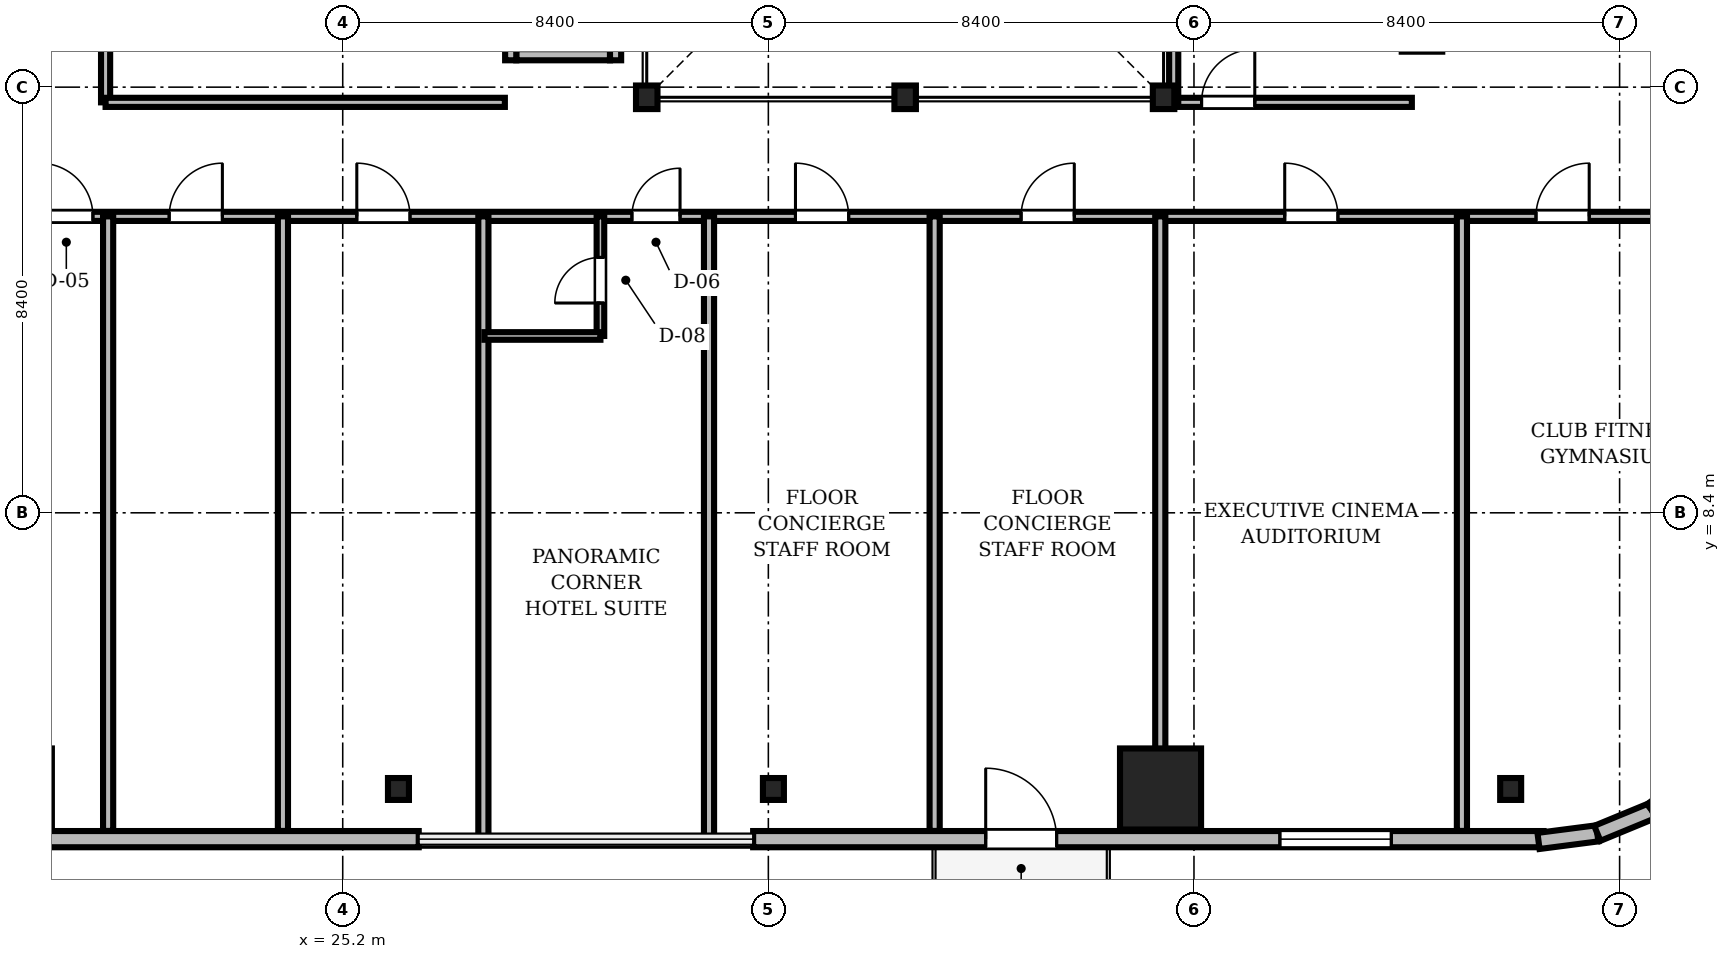
"""IFC4 building model, lengths in metres.
Left out: names, types, materials, properties, quantities, classifications, styles, units other than length and angle.
Written with IfcOpenShell. Run it as: python <this file> out.ifc"""

import sys

from ifc_helpers import new_model, si_unit, direction, frame, frame_2d, origin, origin_2d, place, context, subcontext, project, spatial, rectangle, i_section, extrude, source, transform, mapped, element, fill, save


model = new_model("IFC4")
c1 = context("Model", 3, precision=1e-05, world=origin(), true_north=direction((0.0, 1.0)))
c2 = subcontext(c1, "Body", "Model", "MODEL_VIEW")
j1 = project(units=[si_unit("LENGTHUNIT", "METRE"), si_unit("PLANEANGLEUNIT", "RADIAN")], contexts=[c1])
p1 = place(None, origin())
s1 = spatial("IfcSite", under=j1, at=p1, CompositionType="ELEMENT")
p2 = place(p1, origin())
s2 = spatial("IfcBuilding", under=s1, at=p2, CompositionType="ELEMENT")
p3 = place(p2, frame((0.0, 0.0, 129.8)))
s3 = spatial("IfcBuildingStorey", under=s2, at=p3, CompositionType="ELEMENT", Elevation=129.8)
m1 = source(origin(), c2, "Body", "SweptSolid", [
    extrude(i_section(OverallWidth=0.424, OverallDepth=0.465, WebThickness=0.035, FlangeThickness=0.056, FilletRadius=0.015, at=origin_2d()), origin(), (0.0, 0.0, 1.0), 3.46),
])
for number, where, z_axis, x_axis in (
    (1, (31.2, 16.6, 0.0), (0.0, 0.0, 1.0), (1.0, 0.0, 0.0)),
    (2, (36.3, 16.6, 0.0), (0.0, 0.0, 1.0), (1.0, 0.0, 0.0)),
    (3, (41.4, 16.6, 0.0), (0.0, 0.0, 1.0), (1.0, 0.0, 0.0)),
):
    element("IfcColumn", number, at=place(p3, frame(where, z_axis=z_axis, x_axis=x_axis)), inside=s3, PredefinedType="COLUMN", context=c2, shape_type="MappedRepresentation", body=[
        mapped(m1, transform((0.0, 0.0, 0.0), scale=1.0)),
    ])
m2 = source(origin(), c2, "Body", "SweptSolid", [
    extrude(rectangle(XDim=1.6, YDim=1.6, at=origin_2d()), origin(), (0.0, 0.0, 1.0), 3.46),
])
for number, where, z_axis, x_axis in (
    (4, (18.66, 2.95, 0.0), (0.0, 0.0, 1.0), (1.0, 0.0, 0.0)),
    (5, (41.34, 2.95, 0.0), (0.0, 0.0, 1.0), (1.0, 0.0, 0.0)),
):
    element("IfcColumn", number, at=place(p3, frame(where, z_axis=z_axis, x_axis=x_axis)), inside=s3, PredefinedType="COLUMN", context=c2, shape_type="MappedRepresentation", body=[
        mapped(m2, transform((0.0, 0.0, 0.0), scale=1.0)),
    ])
m3 = source(origin(), c2, "Body", "SweptSolid", [
    extrude(i_section(OverallWidth=0.414, OverallDepth=0.432, WebThickness=0.026, FlangeThickness=0.04, FilletRadius=0.015, at=origin_2d()), origin(), (0.0, 0.0, 1.0), 3.46),
])
for number, where, z_axis, x_axis in (
    (6, (26.3, 2.95, 0.0), (0.0, 0.0, 1.0), (1.0, 0.0, 0.0)),
    (7, (33.7, 2.95, 0.0), (0.0, 0.0, 1.0), (1.0, 0.0, 0.0)),
    (8, (48.25, 2.95, 0.0), (0.0, 0.0, 1.0), (1.0, 0.0, 0.0)),
):
    element("IfcColumn", number, at=place(p3, frame(where, z_axis=z_axis, x_axis=x_axis)), inside=s3, PredefinedType="COLUMN", context=c2, shape_type="MappedRepresentation", body=[
        mapped(m3, transform((0.0, 0.0, 0.0), scale=1.0)),
    ])
m4 = source(origin(), c2, "Body", "SweptSolid", [
    extrude(rectangle(XDim=15.6, YDim=0.32, at=frame_2d((7.8, 0.0))), origin(), (0.0, 0.0, 1.0), 3.46),
])
p4 = place(p3, frame((11.1, 1.96, 0.0), z_axis=(0.0, 0.0, 1.0), x_axis=(1.0, 0.0, 0.0)))
e9 = element("IfcWall", 9, at=p4, inside=s3, PredefinedType="SOLIDWALL", context=c2, shape_type="MappedRepresentation", body=[
    mapped(m4, transform((0.0, 0.0, 0.0), scale=1.0)),
])
m5 = source(origin(), c2, "Body", "SweptSolid", [
    extrude(rectangle(XDim=2.2, YDim=2.4, at=frame_2d((1.1, 1.2))), frame((0.0, 0.17, 0.0), z_axis=(0.0, -1.0, 0.0), x_axis=(1.0, 0.0, 0.0)), (0.0, 0.0, 1.0), 0.34),
])
p5 = place(p4, frame((3.005, 0.0, 0.72)))
e10 = element("IfcOpeningElement", 10, at=p5, cuts=e9, PredefinedType="OPENING", context=c2, shape_type="MappedRepresentation", body=[
    mapped(m5, transform((0.0, 0.0, 0.0), scale=1.0)),
])
p6 = place(p3, frame((33.3, 1.96, 0.0), z_axis=(0.0, 0.0, 1.0), x_axis=(1.0, 0.0, 0.0)))
e11 = element("IfcWall", 11, at=p6, inside=s3, PredefinedType="SOLIDWALL", context=c2, shape_type="MappedRepresentation", body=[
    mapped(m4, transform((0.0, 0.0, 0.0), scale=1.0)),
])
m6 = source(origin(), c2, "Body", "SweptSolid", [
    extrude(rectangle(XDim=1.4, YDim=2.3, at=frame_2d((0.7, 1.15))), frame((0.0, 0.17, 0.0), z_axis=(0.0, -1.0, 0.0), x_axis=(1.0, 0.0, 0.0)), (0.0, 0.0, 1.0), 0.34),
])
p7 = place(p6, frame((4.59, 0.0, 0.0)))
e12 = element("IfcOpeningElement", 12, at=p7, cuts=e11, PredefinedType="OPENING", context=c2, shape_type="MappedRepresentation", body=[
    mapped(m6, transform((0.0, 0.0, 0.0), scale=1.0)),
])
p8 = place(p6, frame((10.395, 0.0, 0.72)))
e13 = element("IfcOpeningElement", 13, at=p8, cuts=e11, PredefinedType="OPENING", context=c2, shape_type="MappedRepresentation", body=[
    mapped(m5, transform((0.0, 0.0, 0.0), scale=1.0)),
])
m7 = source(origin(), c2, "Body", "SweptSolid", [
    extrude(rectangle(XDim=1.17, YDim=0.32, at=frame_2d((0.585, 0.0))), origin(), (0.0, 0.0, 1.0), 3.46),
])
p9 = place(p3, frame((48.8, 1.925, 0.0), z_axis=(0.0, 0.0, 1.0), x_axis=(0.991762485493, 0.128090485085, 0.0)))
e14 = element("IfcWall", 14, at=p9, inside=s3, PredefinedType="SOLIDWALL", context=c2, shape_type="MappedRepresentation", body=[
    mapped(m7, transform((0.0, 0.0, 0.0), scale=1.0)),
])
m8 = source(origin(), c2, "Body", "SweptSolid", [
    extrude(rectangle(XDim=1.169, YDim=0.32, at=frame_2d((0.585, 0.0))), origin(), (0.0, 0.0, 1.0), 3.46),
])
p10 = place(p3, frame((49.96, 2.074, 0.0), z_axis=(0.0, 0.0, 1.0), x_axis=(0.924479075121, 0.381232789334, 0.0)))
e15 = element("IfcWall", 15, at=p10, inside=s3, PredefinedType="SOLIDWALL", context=c2, shape_type="MappedRepresentation", body=[
    mapped(m8, transform((0.0, 0.0, 0.0), scale=1.0)),
])
m9 = source(origin(), c2, "Body", "SweptSolid", [
    extrude(rectangle(XDim=1.169, YDim=0.32, at=frame_2d((0.584, 0.0))), origin(), (0.0, 0.0, 1.0), 3.46),
])
p11 = place(p3, frame((51.041, 2.52, 0.0), z_axis=(0.0, 0.0, 1.0), x_axis=(0.793663520347, 0.608356981114, 0.0)))
e16 = element("IfcWall", 16, at=p11, inside=s3, PredefinedType="SOLIDWALL", context=c2, shape_type="MappedRepresentation", body=[
    mapped(m9, transform((0.0, 0.0, 0.0), scale=1.0)),
])
m10 = source(origin(), c2, "Body", "SweptSolid", [
    extrude(rectangle(XDim=1.85, YDim=0.22, at=frame_2d((0.925, 0.0))), origin(), (0.0, 0.0, 1.0), 3.46),
])
p12 = place(p3, frame((28.625, 17.44, 0.0), z_axis=(0.0, 0.0, 1.0), x_axis=(1.0, 0.0, 0.0)))
e17 = element("IfcWall", 17, at=p12, inside=s3, PredefinedType="SOLIDWALL", context=c2, shape_type="MappedRepresentation", body=[
    mapped(m10, transform((0.0, 0.0, 0.0), scale=1.0)),
])
m11 = source(origin(), c2, "Body", "SweptSolid", [
    extrude(rectangle(XDim=2.54, YDim=0.22, at=frame_2d((1.27, 0.0))), origin(), (0.0, 0.0, 1.0), 3.46),
])
for number, where, z_axis, x_axis in (
    (18, (28.515, 17.33, 0.0), (0.0, 0.0, 1.0), (0.0, 1.0, 0.0)),
    (19, (30.585, 17.33, 0.0), (0.0, 0.0, 1.0), (0.0, 1.0, 0.0)),
):
    element("IfcWall", number, at=place(p3, frame(where, z_axis=z_axis, x_axis=x_axis)), inside=s3, PredefinedType="SOLIDWALL", context=c2, shape_type="MappedRepresentation", body=[
        mapped(m11, transform((0.0, 0.0, 0.0), scale=1.0)),
    ])
m12 = source(origin(), c2, "Body", "SweptSolid", [
    extrude(rectangle(XDim=46.156, YDim=0.18, at=frame_2d((23.078, 0.0))), origin(), (0.0, 0.0, 1.0), 2.702),
])
p13 = place(p3, frame((6.922, 14.25, 0.0), z_axis=(0.0, 0.0, 1.0), x_axis=(1.0, 0.0, 0.0)))
e20 = element("IfcWall", 20, at=p13, inside=s3, PredefinedType="PARTITIONING", context=c2, shape_type="MappedRepresentation", body=[
    mapped(m12, transform((0.0, 0.0, 0.0), scale=1.0)),
])
m13 = source(origin(), c2, "Body", "SweptSolid", [
    extrude(rectangle(XDim=1.05, YDim=2.2, at=frame_2d((0.525, 1.1))), frame((0.0, 0.1, 0.0), z_axis=(0.0, -1.0, 0.0), x_axis=(1.0, 0.0, 0.0)), (0.0, 0.0, 1.0), 0.2),
])
p14 = place(p13, frame((12.298, 0.0, 0.0)))
e21 = element("IfcOpeningElement", 21, at=p14, cuts=e20, PredefinedType="OPENING", context=c2, shape_type="MappedRepresentation", body=[
    mapped(m13, transform((0.0, 0.0, 0.0), scale=1.0)),
])
p15 = place(p13, frame((14.853, 0.0, 0.0)))
e22 = element("IfcOpeningElement", 22, at=p15, cuts=e20, PredefinedType="OPENING", context=c2, shape_type="MappedRepresentation", body=[
    mapped(m13, transform((0.0, 0.0, 0.0), scale=1.0)),
])
p16 = place(p13, frame((18.556, 0.0, 0.0)))
e23 = element("IfcOpeningElement", 23, at=p16, cuts=e20, PredefinedType="OPENING", context=c2, shape_type="MappedRepresentation", body=[
    mapped(m13, transform((0.0, 0.0, 0.0), scale=1.0)),
])
m14 = source(origin(), c2, "Body", "SweptSolid", [
    extrude(rectangle(XDim=0.95, YDim=2.15, at=frame_2d((0.475, 1.075))), frame((0.0, 0.1, 0.0), z_axis=(0.0, -1.0, 0.0), x_axis=(1.0, 0.0, 0.0)), (0.0, 0.0, 1.0), 0.2),
])
p17 = place(p13, frame((23.985, 0.0, 0.0)))
e24 = element("IfcOpeningElement", 24, at=p17, cuts=e20, PredefinedType="OPENING", context=c2, shape_type="MappedRepresentation", body=[
    mapped(m14, transform((0.0, 0.0, 0.0), scale=1.0)),
])
p18 = place(p13, frame((27.213, 0.0, 0.0)))
e25 = element("IfcOpeningElement", 25, at=p18, cuts=e20, PredefinedType="OPENING", context=c2, shape_type="MappedRepresentation", body=[
    mapped(m13, transform((0.0, 0.0, 0.0), scale=1.0)),
])
p19 = place(p13, frame((31.666, 0.0, 0.0)))
e26 = element("IfcOpeningElement", 26, at=p19, cuts=e20, PredefinedType="OPENING", context=c2, shape_type="MappedRepresentation", body=[
    mapped(m13, transform((0.0, 0.0, 0.0), scale=1.0)),
])
p20 = place(p13, frame((36.869, 0.0, 0.0)))
e27 = element("IfcOpeningElement", 27, at=p20, cuts=e20, PredefinedType="OPENING", context=c2, shape_type="MappedRepresentation", body=[
    mapped(m13, transform((0.0, 0.0, 0.0), scale=1.0)),
])
p21 = place(p13, frame((41.828, 0.0, 0.0)))
e28 = element("IfcOpeningElement", 28, at=p21, cuts=e20, PredefinedType="OPENING", context=c2, shape_type="MappedRepresentation", body=[
    mapped(m13, transform((0.0, 0.0, 0.0), scale=1.0)),
])
m15 = source(origin(), c2, "Body", "SweptSolid", [
    extrude(rectangle(XDim=11.94, YDim=0.18, at=frame_2d((5.97, 0.0))), origin(), (0.0, 0.0, 1.0), 2.852),
])
p22 = place(p3, frame((20.52, 16.5, 0.0), z_axis=(0.0, 0.0, 1.0), x_axis=(0.0, 1.0, 0.0)))
e29 = element("IfcWall", 29, at=p22, inside=s3, PredefinedType="PARTITIONING", context=c2, shape_type="MappedRepresentation", body=[
    mapped(m15, transform((0.0, 0.0, 0.0), scale=1.0)),
])
p23 = place(p22, frame((4.5, 0.0, 0.0)))
e30 = element("IfcOpeningElement", 30, at=p23, cuts=e29, PredefinedType="OPENING", context=c2, shape_type="MappedRepresentation", body=[
    mapped(m13, transform((0.0, 0.0, 0.0), scale=1.0)),
])
m16 = source(origin(), c2, "Body", "SweptSolid", [
    extrude(rectangle(XDim=4.7, YDim=0.18, at=frame_2d((2.35, 0.0))), origin(), (0.0, 0.0, 1.0), 2.852),
])
p24 = place(p3, frame((41.6, 16.5, 0.0), z_axis=(0.0, 0.0, 1.0), x_axis=(1.0, 0.0, 0.0)))
e31 = element("IfcWall", 31, at=p24, inside=s3, PredefinedType="PARTITIONING", context=c2, shape_type="MappedRepresentation", body=[
    mapped(m16, transform((0.0, 0.0, 0.0), scale=1.0)),
])
p25 = place(p24, frame((0.55, 0.0, 0.0)))
e32 = element("IfcOpeningElement", 32, at=p25, cuts=e31, PredefinedType="OPENING", context=c2, shape_type="MappedRepresentation", body=[
    mapped(m13, transform((0.0, 0.0, 0.0), scale=1.0)),
])
m17 = source(origin(), c2, "Body", "SweptSolid", [
    extrude(rectangle(XDim=2.36, YDim=0.15, at=frame_2d((1.18, 0.0))), origin(), (0.0, 0.0, 1.0), 2.852),
])
p26 = place(p3, frame((30.286, 11.89, 0.0), z_axis=(0.0, 0.0, 1.0), x_axis=(0.0, 1.0, 0.0)))
e33 = element("IfcWall", 33, at=p26, inside=s3, PredefinedType="PARTITIONING", context=c2, shape_type="MappedRepresentation", body=[
    mapped(m17, transform((0.0, 0.0, 0.0), scale=1.0)),
])
m18 = source(origin(), c2, "Body", "SweptSolid", [
    extrude(rectangle(XDim=0.9, YDim=2.1, at=frame_2d((0.45, 1.05))), frame((0.0, 0.085, 0.0), z_axis=(0.0, -1.0, 0.0), x_axis=(1.0, 0.0, 0.0)), (0.0, 0.0, 1.0), 0.17),
])
p27 = place(p26, frame((0.65, 0.0, 0.0)))
e34 = element("IfcOpeningElement", 34, at=p27, cuts=e33, PredefinedType="OPENING", context=c2, shape_type="MappedRepresentation", body=[
    mapped(m18, transform((0.0, 0.0, 0.0), scale=1.0)),
])
m19 = source(origin(), c2, "Body", "SweptSolid", [
    extrude(rectangle(XDim=12.128, YDim=0.2, at=frame_2d((6.064, 0.0))), origin(), (0.0, 0.0, 1.0), 2.702),
])
for number, where, z_axis, x_axis in (
    (35, (20.57, 2.122, 0.0), (0.0, 0.0, 1.0), (0.0, 1.0, 0.0)),
    (36, (24.02, 2.122, 0.0), (0.0, 0.0, 1.0), (0.0, 1.0, 0.0)),
):
    element("IfcWall", number, at=place(p3, frame(where, z_axis=z_axis, x_axis=x_axis)), inside=s3, PredefinedType="PARTITIONING", context=c2, shape_type="MappedRepresentation", body=[
        mapped(m19, transform((0.0, 0.0, 0.0), scale=1.0)),
    ])
m20 = source(origin(), c2, "Body", "SweptSolid", [
    extrude(rectangle(XDim=12.32, YDim=0.2, at=frame_2d((6.16, 0.0))), origin(), (0.0, 0.0, 1.0), 2.702),
])
for number, where, z_axis, x_axis in (
    (37, (27.976, 1.93, 0.0), (0.0, 0.0, 1.0), (0.0, 1.0, 0.0)),
    (38, (32.429, 1.93, 0.0), (0.0, 0.0, 1.0), (0.0, 1.0, 0.0)),
):
    element("IfcWall", number, at=place(p3, frame(where, z_axis=z_axis, x_axis=x_axis)), inside=s3, PredefinedType="PARTITIONING", context=c2, shape_type="MappedRepresentation", body=[
        mapped(m20, transform((0.0, 0.0, 0.0), scale=1.0)),
    ])
for number, where, z_axis, x_axis in (
    (39, (36.882, 2.122, 0.0), (0.0, 0.0, 1.0), (0.0, 1.0, 0.0)),
    (40, (41.335, 2.122, 0.0), (0.0, 0.0, 1.0), (0.0, 1.0, 0.0)),
    (41, (47.288, 2.122, 0.0), (0.0, 0.0, 1.0), (0.0, 1.0, 0.0)),
):
    element("IfcWall", number, at=place(p3, frame(where, z_axis=z_axis, x_axis=x_axis)), inside=s3, PredefinedType="PARTITIONING", context=c2, shape_type="MappedRepresentation", body=[
        mapped(m19, transform((0.0, 0.0, 0.0), scale=1.0)),
    ])
m21 = source(origin(), c2, "Body", "SweptSolid", [
    extrude(rectangle(XDim=7.88, YDim=0.18, at=frame_2d((3.94, 0.0))), origin(), (0.0, 0.0, 1.0), 3.46),
])
p28 = place(p3, frame((20.52, 16.5, 0.0), z_axis=(0.0, 0.0, 1.0), x_axis=(1.0, 0.0, 0.0)))
e42 = element("IfcWall", 42, at=p28, inside=s3, PredefinedType="PARTITIONING", context=c2, shape_type="MappedRepresentation", body=[
    mapped(m21, transform((0.0, 0.0, 0.0), scale=1.0)),
])
m22 = source(origin(), c2, "Body", "SweptSolid", [
    extrude(rectangle(XDim=7.15, YDim=0.18, at=frame_2d((3.575, 0.0))), origin(), (0.0, 0.0, 1.0), 2.852),
])
p29 = place(p3, frame((41.6, 16.5, 0.0), z_axis=(0.0, 0.0, 1.0), x_axis=(0.0, 1.0, 0.0)))
e43 = element("IfcWall", 43, at=p29, inside=s3, PredefinedType="PARTITIONING", context=c2, shape_type="MappedRepresentation", body=[
    mapped(m22, transform((0.0, 0.0, 0.0), scale=1.0)),
])
m23 = source(origin(), c2, "Body", "SweptSolid", [
    extrude(rectangle(XDim=2.29, YDim=0.15, at=frame_2d((1.145, 0.0))), origin(), (0.0, 0.0, 1.0), 2.852),
])
p30 = place(p3, frame((27.996, 11.89, 0.0), z_axis=(0.0, 0.0, 1.0), x_axis=(1.0, 0.0, 0.0)))
e44 = element("IfcWall", 44, at=p30, inside=s3, PredefinedType="PARTITIONING", context=c2, shape_type="MappedRepresentation", body=[
    mapped(m23, transform((0.0, 0.0, 0.0), scale=1.0)),
])
m24 = source(origin(), c2, "Body", "SweptSolid", [
    extrude(rectangle(XDim=1.4, YDim=2.3, at=frame_2d((0.7, 1.15))), frame((0.0, 0.025, 0.0), z_axis=(0.0, -1.0, 0.0), x_axis=(1.0, 0.0, 0.0)), (0.0, 0.0, 1.0), 0.05),
])
p31 = place(p7, frame((1.4, 0.0, 0.0), z_axis=(0.0, 0.0, 1.0), x_axis=(-1.0, 0.0, 0.0)))
e45 = element("IfcDoor", 45, at=p31, inside=s3, OperationType="DOUBLE_DOOR_SLIDING", PredefinedType="DOOR", context=c2, shape_type="MappedRepresentation", body=[
    mapped(m24, transform((0.0, 0.0, 0.0), scale=1.0)),
])
fill(e12, e45)
m25 = source(origin(), c2, "Body", "SweptSolid", [
    extrude(rectangle(XDim=2.2, YDim=2.4, at=frame_2d((1.1, 1.2))), frame((0.0, 0.03, 0.0), z_axis=(0.0, -1.0, 0.0), x_axis=(1.0, 0.0, 0.0)), (0.0, 0.0, 1.0), 0.06),
])
p32 = place(p8, origin())
e46 = element("IfcWindow", 46, at=p32, inside=s3, PartitioningType="SINGLE_PANEL", PredefinedType="WINDOW", context=c2, shape_type="MappedRepresentation", body=[
    mapped(m25, transform((0.0, 0.0, 0.0), scale=1.0)),
])
fill(e13, e46)
m26 = source(origin(), c2, "Body", "SweptSolid", [
    extrude(rectangle(XDim=1.05, YDim=2.2, at=frame_2d((0.525, 1.1))), frame((0.0, 0.025, 0.0), z_axis=(0.0, -1.0, 0.0), x_axis=(1.0, 0.0, 0.0)), (0.0, 0.0, 1.0), 0.05),
])
p33 = place(p14, origin())
e47 = element("IfcDoor", 47, at=p33, inside=s3, OperationType="SINGLE_SWING_LEFT", PredefinedType="DOOR", context=c2, shape_type="MappedRepresentation", body=[
    mapped(m26, transform((0.0, 0.0, 0.0), scale=1.0)),
])
fill(e21, e47)
p34 = place(p15, origin())
e48 = element("IfcDoor", 48, at=p34, inside=s3, OperationType="SINGLE_SWING_RIGHT", PredefinedType="DOOR", context=c2, shape_type="MappedRepresentation", body=[
    mapped(m26, transform((0.0, 0.0, 0.0), scale=1.0)),
])
fill(e22, e48)
p35 = place(p16, origin())
e49 = element("IfcDoor", 49, at=p35, inside=s3, OperationType="SINGLE_SWING_LEFT", PredefinedType="DOOR", context=c2, shape_type="MappedRepresentation", body=[
    mapped(m26, transform((0.0, 0.0, 0.0), scale=1.0)),
])
fill(e23, e49)
m27 = source(origin(), c2, "Body", "SweptSolid", [
    extrude(rectangle(XDim=0.95, YDim=2.15, at=frame_2d((0.475, 1.075))), frame((0.0, 0.025, 0.0), z_axis=(0.0, -1.0, 0.0), x_axis=(1.0, 0.0, 0.0)), (0.0, 0.0, 1.0), 0.05),
])
p36 = place(p17, origin())
e50 = element("IfcDoor", 50, at=p36, inside=s3, OperationType="SINGLE_SWING_RIGHT", PredefinedType="DOOR", context=c2, shape_type="MappedRepresentation", body=[
    mapped(m27, transform((0.0, 0.0, 0.0), scale=1.0)),
])
fill(e24, e50)
p37 = place(p18, origin())
e51 = element("IfcDoor", 51, at=p37, inside=s3, OperationType="SINGLE_SWING_LEFT", PredefinedType="DOOR", context=c2, shape_type="MappedRepresentation", body=[
    mapped(m26, transform((0.0, 0.0, 0.0), scale=1.0)),
])
fill(e25, e51)
p38 = place(p19, origin())
e52 = element("IfcDoor", 52, at=p38, inside=s3, OperationType="SINGLE_SWING_RIGHT", PredefinedType="DOOR", context=c2, shape_type="MappedRepresentation", body=[
    mapped(m26, transform((0.0, 0.0, 0.0), scale=1.0)),
])
fill(e26, e52)
p39 = place(p20, origin())
e53 = element("IfcDoor", 53, at=p39, inside=s3, OperationType="SINGLE_SWING_LEFT", PredefinedType="DOOR", context=c2, shape_type="MappedRepresentation", body=[
    mapped(m26, transform((0.0, 0.0, 0.0), scale=1.0)),
])
fill(e27, e53)
p40 = place(p21, origin())
e54 = element("IfcDoor", 54, at=p40, inside=s3, OperationType="SINGLE_SWING_RIGHT", PredefinedType="DOOR", context=c2, shape_type="MappedRepresentation", body=[
    mapped(m26, transform((0.0, 0.0, 0.0), scale=1.0)),
])
fill(e28, e54)
p41 = place(p25, origin())
e55 = element("IfcDoor", 55, at=p41, inside=s3, OperationType="SINGLE_SWING_RIGHT", PredefinedType="DOOR", context=c2, shape_type="MappedRepresentation", body=[
    mapped(m26, transform((0.0, 0.0, 0.0), scale=1.0)),
])
fill(e32, e55)
m28 = source(origin(), c2, "Body", "SweptSolid", [
    extrude(rectangle(XDim=0.9, YDim=2.1, at=frame_2d((0.45, 1.05))), frame((0.0, 0.025, 0.0), z_axis=(0.0, -1.0, 0.0), x_axis=(1.0, 0.0, 0.0)), (0.0, 0.0, 1.0), 0.05),
])
p42 = place(p27, origin())
e56 = element("IfcDoor", 56, at=p42, inside=s3, OperationType="SINGLE_SWING_LEFT", PredefinedType="DOOR", context=c2, shape_type="MappedRepresentation", body=[
    mapped(m28, transform((0.0, 0.0, 0.0), scale=1.0)),
])
fill(e34, e56)
save(model, sys.argv[1])
